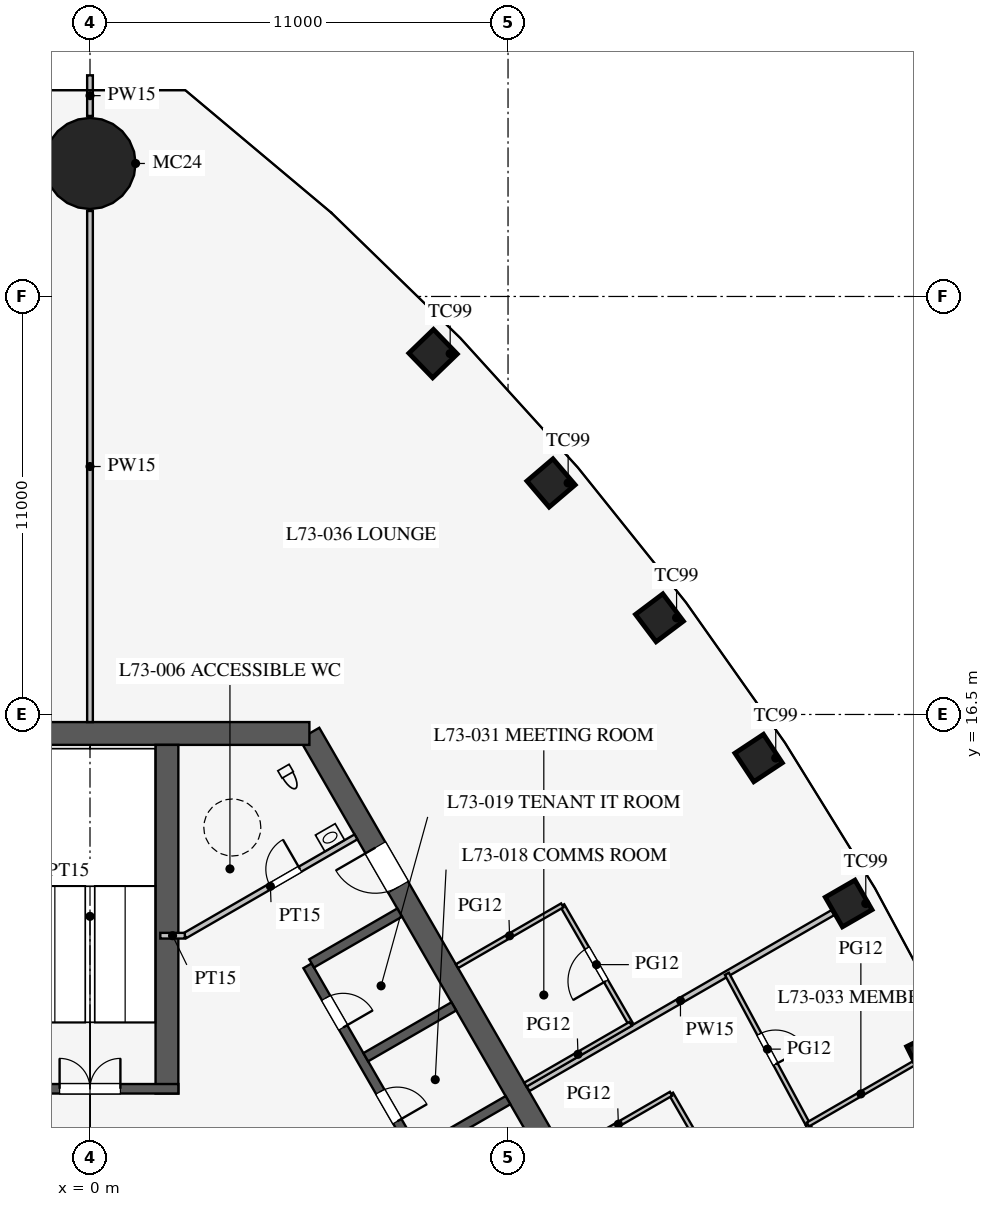
"""IFC4 building model, lengths in metres.
Left out: names, types, materials, properties, quantities, classifications, styles, units other than length and angle.
Written with IfcOpenShell. Run it as: python <this file> out.ifc"""

import sys

from ifc_helpers import new_model, si_unit, direction, frame, frame_2d, origin, origin_2d, place, context, subcontext, project, spatial, rectangle, circle, extrude, element, fill, save


model = new_model("IFC4")
c1 = context("Model", 3, precision=1e-05, world=origin(), true_north=direction((0.0, 1.0)))
c2 = subcontext(c1, "Body", "Model", "MODEL_VIEW")
j1 = project(units=[si_unit("LENGTHUNIT", "METRE"), si_unit("PLANEANGLEUNIT", "RADIAN")], contexts=[c1])
p1 = place(None, origin())
s1 = spatial("IfcSite", under=j1, at=p1, CompositionType="ELEMENT")
p2 = place(p1, origin())
s2 = spatial("IfcBuilding", under=s1, at=p2, CompositionType="ELEMENT")
p3 = place(p2, frame((0.0, 0.0, 318.3)))
s3 = spatial("IfcBuildingStorey", under=s2, at=p3, CompositionType="ELEMENT", Elevation=318.3)
for number, where, z_axis, x_axis in (
    (1, (22.094, 7.56, 0.0), (0.0, 0.0, 1.0), (-0.447, 0.895, 0.0)),
    (2, (19.963, 11.526, 0.0), (0.0, 0.0, 1.0), (-0.5, 0.866, 0.0)),
    (3, (17.594, 15.354, 0.0), (0.0, 0.0, 1.0), (-0.552, 0.834, 0.0)),
    (4, (14.985, 19.044, 0.0), (0.0, 0.0, 1.0), (-0.601, 0.799, 0.0)),
    (5, (12.132, 22.593, 0.0), (0.0, 0.0, 1.0), (-0.649, 0.761, 0.0)),
    (6, (9.027, 25.997, 0.0), (0.0, 0.0, 1.0), (-0.695, 0.719, 0.0)),
):
    element("IfcColumn", number, at=place(p3, frame(where, z_axis=z_axis, x_axis=x_axis)), inside=s3, PredefinedType="COLUMN", context=c2, shape_type="SweptSolid", body=[
        extrude(rectangle(XDim=0.9, YDim=0.9, at=origin_2d()), origin(), (0.0, 0.0, 1.0), 4.2),
    ])
p4 = place(p3, frame((0.0, 31.0, 0.0), z_axis=(0.0, 0.0, 1.0), x_axis=(1.0, 0.0, 0.0)))
e7 = element("IfcColumn", 7, at=p4, inside=s3, PredefinedType="COLUMN", context=c2, shape_type="SweptSolid", body=[
    extrude(circle(Radius=1.2, at=origin_2d()), origin(), (0.0, 0.0, 1.0), 4.2),
])
p5 = place(p3, frame((16.743, -3.0, 0.0), z_axis=(0.0, 0.0, 1.0), x_axis=(-0.500002442456, 0.866023993627, 0.0)))
e8 = element("IfcWall", 8, at=p5, inside=s3, PredefinedType="SHEAR", context=c2, shape_type="SweptSolid", body=[
    extrude(rectangle(XDim=21.939, YDim=0.6, at=frame_2d((10.97, 0.0))), origin(), (0.0, 0.0, 1.0), 4.2),
])
p6 = place(p5, frame((17.27, 0.0, 0.0)))
e9 = element("IfcOpeningElement", 9, at=p6, cuts=e8, PredefinedType="OPENING", context=c2, shape_type="SweptSolid", body=[
    extrude(rectangle(XDim=1.2, YDim=2.1, at=frame_2d((0.6, 1.05))), frame((0.0, 0.31, 0.0), z_axis=(0.0, -1.0, 0.0), x_axis=(1.0, 0.0, 0.0)), (0.0, 0.0, 1.0), 0.62),
])
p7 = place(p5, frame((3.47, 0.0, 0.0)))
e10 = element("IfcOpeningElement", 10, at=p7, cuts=e8, PredefinedType="OPENING", context=c2, shape_type="SweptSolid", body=[
    extrude(rectangle(XDim=1.2, YDim=2.1, at=frame_2d((0.6, 1.05))), frame((0.0, 0.31, 0.0), z_axis=(0.0, -1.0, 0.0), x_axis=(1.0, 0.0, 0.0)), (0.0, 0.0, 1.0), 0.62),
])
p8 = place(p3, frame((5.773, 16.0, 0.0), z_axis=(0.0, 0.0, 1.0), x_axis=(-1.0, 0.0, 0.0)))
e11 = element("IfcWall", 11, at=p8, inside=s3, PredefinedType="SHEAR", context=c2, shape_type="SweptSolid", body=[
    extrude(rectangle(XDim=11.547, YDim=0.6, at=frame_2d((5.773, 0.0))), origin(), (0.0, 0.0, 1.0), 4.2),
])
p9 = place(p3, frame((11.424, 0.014, 0.0), z_axis=(0.0, 0.0, 1.0), x_axis=(-0.500001763848, 0.866024385424, 0.0)))
e12 = element("IfcWall", 12, at=p9, inside=s3, PredefinedType="SHEAR", context=c2, shape_type="SweptSolid", body=[
    extrude(rectangle(XDim=11.4, YDim=0.25, at=frame_2d((5.7, 0.0))), origin(), (0.0, 0.0, 1.0), 4.2),
])
p10 = place(p9, frame((0.975, 0.0, 0.0)))
e13 = element("IfcOpeningElement", 13, at=p10, cuts=e12, PredefinedType="OPENING", context=c2, shape_type="SweptSolid", body=[
    extrude(rectangle(XDim=0.9, YDim=2.1, at=frame_2d((0.45, 1.05))), frame((0.0, 0.135, 0.0), z_axis=(0.0, -1.0, 0.0), x_axis=(1.0, 0.0, 0.0)), (0.0, 0.0, 1.0), 0.27),
])
p11 = place(p9, frame((3.825, 0.0, 0.0)))
e14 = element("IfcOpeningElement", 14, at=p11, cuts=e12, PredefinedType="OPENING", context=c2, shape_type="SweptSolid", body=[
    extrude(rectangle(XDim=0.9, YDim=2.1, at=frame_2d((0.45, 1.05))), frame((0.0, 0.135, 0.0), z_axis=(0.0, -1.0, 0.0), x_axis=(1.0, 0.0, 0.0)), (0.0, 0.0, 1.0), 0.27),
])
p12 = place(p9, frame((6.675, 0.0, 0.0)))
e15 = element("IfcOpeningElement", 15, at=p12, cuts=e12, PredefinedType="OPENING", context=c2, shape_type="SweptSolid", body=[
    extrude(rectangle(XDim=0.9, YDim=2.1, at=frame_2d((0.45, 1.05))), frame((0.0, 0.135, 0.0), z_axis=(0.0, -1.0, 0.0), x_axis=(1.0, 0.0, 0.0)), (0.0, 0.0, 1.0), 0.27),
])
p13 = place(p9, frame((9.525, 0.0, 0.0)))
e16 = element("IfcOpeningElement", 16, at=p13, cuts=e12, PredefinedType="OPENING", context=c2, shape_type="SweptSolid", body=[
    extrude(rectangle(XDim=0.9, YDim=2.1, at=frame_2d((0.45, 1.05))), frame((0.0, 0.135, 0.0), z_axis=(0.0, -1.0, 0.0), x_axis=(1.0, 0.0, 0.0)), (0.0, 0.0, 1.0), 0.27),
])
for number, where, z_axis, x_axis in (
    (17, (8.682, 5.012, 0.0), (0.0, 0.0, 1.0), (0.866, 0.5, 0.0)),
    (18, (7.257, 7.481, 0.0), (0.0, 0.0, 1.0), (0.866, 0.5, 0.0)),
    (19, (5.832, 9.949, 0.0), (0.0, 0.0, 1.0), (0.866, 0.5, 0.0)),
):
    element("IfcWall", number, at=place(p3, frame(where, z_axis=z_axis, x_axis=x_axis)), inside=s3, PredefinedType="SHEAR", context=c2, shape_type="SweptSolid", body=[
        extrude(rectangle(XDim=2.675, YDim=0.25, at=frame_2d((1.337, 0.0))), origin(), (0.0, 0.0, 1.0), 4.2),
    ])
p14 = place(p3, frame((2.025, 6.525, 0.0), z_axis=(0.0, 0.0, 1.0), x_axis=(0.0, 1.0, 0.0)))
e20 = element("IfcWall", 20, at=p14, inside=s3, PredefinedType="SHEAR", context=c2, shape_type="SweptSolid", body=[
    extrude(rectangle(XDim=9.175, YDim=0.6, at=frame_2d((4.587, 0.0))), origin(), (0.0, 0.0, 1.0), 4.2),
])
p15 = place(p3, frame((2.325, 6.65, 0.0), z_axis=(0.0, 0.0, 1.0), x_axis=(-1.0, 0.0, 0.0)))
e21 = element("IfcWall", 21, at=p15, inside=s3, PredefinedType="SHEAR", context=c2, shape_type="SweptSolid", body=[
    extrude(rectangle(XDim=4.65, YDim=0.25, at=frame_2d((2.325, 0.0))), origin(), (0.0, 0.0, 1.0), 4.2),
])
p16 = place(p15, frame((1.525, 0.0, 0.0)))
e22 = element("IfcOpeningElement", 22, at=p16, cuts=e21, PredefinedType="OPENING", context=c2, shape_type="SweptSolid", body=[
    extrude(rectangle(XDim=1.6, YDim=2.1, at=frame_2d((0.8, 1.05))), frame((0.0, 0.135, 0.0), z_axis=(0.0, -1.0, 0.0), x_axis=(1.0, 0.0, 0.0)), (0.0, 0.0, 1.0), 0.27),
])
p17 = place(p3, frame((2.495, 10.678, 0.0), z_axis=(0.0, 0.0, 1.0), x_axis=(0.866021400173, 0.500006934395, 0.0)))
e23 = element("IfcWall", 23, at=p17, inside=s3, PredefinedType="PARTITIONING", context=c2, shape_type="SweptSolid", body=[
    extrude(rectangle(XDim=5.2, YDim=0.15, at=frame_2d((2.6, 0.0))), origin(), (0.0, 0.0, 1.0), 4.0),
])
p18 = place(p17, frame((2.6, 0.0, 0.0)))
e24 = element("IfcOpeningElement", 24, at=p18, cuts=e23, PredefinedType="OPENING", context=c2, shape_type="SweptSolid", body=[
    extrude(rectangle(XDim=0.9, YDim=2.1, at=frame_2d((0.45, 1.05))), frame((0.0, 0.085, 0.0), z_axis=(0.0, -1.0, 0.0), x_axis=(1.0, 0.0, 0.0)), (0.0, 0.0, 1.0), 0.17),
])
p19 = place(p3, frame((2.495, 10.678, 0.0), z_axis=(0.0, 0.0, 1.0), x_axis=(-1.0, 0.0, 0.0)))
e25 = element("IfcWall", 25, at=p19, inside=s3, PredefinedType="PARTITIONING", context=c2, shape_type="SweptSolid", body=[
    extrude(rectangle(XDim=0.645, YDim=0.15, at=frame_2d((0.323, 0.0))), origin(), (0.0, 0.0, 1.0), 4.0),
])
p20 = place(p3, frame((0.0, 16.3, 0.0), z_axis=(0.0, 0.0, 1.0), x_axis=(0.0, 1.0, 0.0)))
e26 = element("IfcWall", 26, at=p20, inside=s3, PredefinedType="PARTITIONING", context=c2, shape_type="SweptSolid", body=[
    extrude(rectangle(XDim=13.45, YDim=0.15, at=frame_2d((6.725, 0.0))), origin(), (0.0, 0.0, 1.0), 2.0),
])
p21 = place(p3, frame((0.0, 32.25, 0.0), z_axis=(0.0, 0.0, 1.0), x_axis=(0.0, 1.0, 0.0)))
e27 = element("IfcWall", 27, at=p21, inside=s3, PredefinedType="PARTITIONING", context=c2, shape_type="SweptSolid", body=[
    extrude(rectangle(XDim=1.07, YDim=0.15, at=frame_2d((0.535, 0.0))), origin(), (0.0, 0.0, 1.0), 2.0),
])
p22 = place(p3, frame((11.527, 6.655, 0.0), z_axis=(0.0, 0.0, 1.0), x_axis=(0.866021846952, 0.500006160563, 0.0)))
e28 = element("IfcWall", 28, at=p22, inside=s3, PredefinedType="PARTITIONING", context=c2, shape_type="SweptSolid", body=[
    extrude(rectangle(XDim=9.262, YDim=0.15, at=frame_2d((4.631, 0.0))), origin(), (0.0, 0.0, 1.0), 3.3),
])
p23 = place(p3, frame((14.227, 8.358, 0.0), z_axis=(0.0, 0.0, 1.0), x_axis=(-0.499961193289, 0.866047807691, 0.0)))
e29 = element("IfcWall", 29, at=p23, inside=s3, PredefinedType="PARTITIONING", context=c2, shape_type="SweptSolid", body=[
    extrude(rectangle(XDim=3.6, YDim=0.12, at=frame_2d((1.8, 0.0))), origin(), (0.0, 0.0, 1.0), 2.9),
])
p24 = place(p23, frame((1.3, 0.0, 0.15)))
e30 = element("IfcOpeningElement", 30, at=p24, cuts=e29, PredefinedType="OPENING", context=c2, shape_type="SweptSolid", body=[
    extrude(rectangle(XDim=1.0, YDim=2.1, at=frame_2d((0.5, 1.05))), frame((0.0, 0.07, 0.0), z_axis=(0.0, -1.0, 0.0), x_axis=(1.0, 0.0, 0.0)), (0.0, 0.0, 1.0), 0.14),
])
p25 = place(p3, frame((17.089, 3.4, 0.0), z_axis=(0.0, 0.0, 1.0), x_axis=(-0.499982693035, 0.866035395735, 0.0)))
e31 = element("IfcWall", 31, at=p25, inside=s3, PredefinedType="PARTITIONING", context=c2, shape_type="SweptSolid", body=[
    extrude(rectangle(XDim=3.6, YDim=0.12, at=frame_2d((1.8, 0.0))), origin(), (0.0, 0.0, 1.0), 2.9),
])
p26 = place(p25, frame((1.3, 0.0, 0.15)))
e32 = element("IfcOpeningElement", 32, at=p26, cuts=e31, PredefinedType="OPENING", context=c2, shape_type="SweptSolid", body=[
    extrude(rectangle(XDim=1.0, YDim=2.1, at=frame_2d((0.5, 1.05))), frame((0.0, 0.07, 0.0), z_axis=(0.0, -1.0, 0.0), x_axis=(1.0, 0.0, 0.0)), (0.0, 0.0, 1.0), 0.14),
])
p27 = place(p3, frame((11.456, 6.758, 0.0), z_axis=(0.0, 0.0, 1.0), x_axis=(0.866042017984, 0.499971222258, 0.0)))
e33 = element("IfcWall", 33, at=p27, inside=s3, PredefinedType="PARTITIONING", context=c2, shape_type="SweptSolid", body=[
    extrude(rectangle(XDim=3.2, YDim=0.12, at=frame_2d((1.6, 0.0))), origin(), (0.0, 0.0, 1.0), 2.9),
])
p28 = place(p3, frame((9.656, 9.876, 0.0), z_axis=(0.0, 0.0, 1.0), x_axis=(0.866061088033, 0.499938187974, 0.0)))
e34 = element("IfcWall", 34, at=p28, inside=s3, PredefinedType="PARTITIONING", context=c2, shape_type="SweptSolid", body=[
    extrude(rectangle(XDim=3.2, YDim=0.12, at=frame_2d((1.6, 0.0))), origin(), (0.0, 0.0, 1.0), 2.9),
])
p29 = place(p3, frame((12.518, 4.918, 0.0), z_axis=(0.0, 0.0, 1.0), x_axis=(0.866008981251, 0.500028443584, 0.0)))
e35 = element("IfcWall", 35, at=p29, inside=s3, PredefinedType="PARTITIONING", context=c2, shape_type="SweptSolid", body=[
    extrude(rectangle(XDim=3.2, YDim=0.12, at=frame_2d((1.6, 0.0))), origin(), (0.0, 0.0, 1.0), 2.9),
])
p30 = place(p3, frame((18.891, 5.71, 0.0), z_axis=(0.0, 0.0, 1.0), x_axis=(-0.473524102582, 0.880780860529, 0.0)))
e36 = element("IfcWall", 36, at=p30, inside=s3, PredefinedType="PARTITIONING", context=c2, shape_type="SweptSolid", body=[
    extrude(rectangle(XDim=4.502, YDim=0.12, at=frame_2d((2.251, 0.0))), origin(), (0.0, 0.0, 1.0), 2.9),
])
p31 = place(p30, frame((1.8, 0.0, 0.15)))
e37 = element("IfcOpeningElement", 37, at=p31, cuts=e36, PredefinedType="OPENING", context=c2, shape_type="SweptSolid", body=[
    extrude(rectangle(XDim=0.9, YDim=2.1, at=frame_2d((0.45, 1.05))), frame((0.0, 0.07, 0.0), z_axis=(0.0, -1.0, 0.0), x_axis=(1.0, 0.0, 0.0)), (0.0, 0.0, 1.0), 0.14),
])
p32 = place(p3, frame((20.786, 1.608, 0.0), z_axis=(0.0, 0.0, 1.0), x_axis=(-0.419335693458, 0.907831248742, 0.0)))
e38 = element("IfcWall", 38, at=p32, inside=s3, PredefinedType="PARTITIONING", context=c2, shape_type="SweptSolid", body=[
    extrude(rectangle(XDim=4.519, YDim=0.12, at=frame_2d((2.259, 0.0))), origin(), (0.0, 0.0, 1.0), 2.9),
])
p33 = place(p32, frame((1.8, 0.0, 0.15)))
e39 = element("IfcOpeningElement", 39, at=p33, cuts=e38, PredefinedType="OPENING", context=c2, shape_type="SweptSolid", body=[
    extrude(rectangle(XDim=0.9, YDim=2.1, at=frame_2d((0.45, 1.05))), frame((0.0, 0.07, 0.0), z_axis=(0.0, -1.0, 0.0), x_axis=(1.0, 0.0, 0.0)), (0.0, 0.0, 1.0), 0.14),
])
p34 = place(p3, frame((18.891, 5.71, 0.0), z_axis=(0.0, 0.0, 1.0), x_axis=(0.866021328928, 0.500007057792, 0.0)))
e40 = element("IfcWall", 40, at=p34, inside=s3, PredefinedType="PARTITIONING", context=c2, shape_type="SweptSolid", body=[
    extrude(rectangle(XDim=3.218, YDim=0.12, at=frame_2d((1.609, 0.0))), origin(), (0.0, 0.0, 1.0), 2.9),
])
p35 = place(p18, origin())
e41 = element("IfcDoor", 41, at=p35, inside=s3, OperationType="SINGLE_SWING_RIGHT", PredefinedType="DOOR", context=c2, shape_type="SweptSolid", body=[
    extrude(rectangle(XDim=0.9, YDim=2.1, at=frame_2d((0.45, 1.05))), frame((0.0, 0.025, 0.0), z_axis=(0.0, -1.0, 0.0), x_axis=(1.0, 0.0, 0.0)), (0.0, 0.0, 1.0), 0.05),
])
fill(e24, e41)
p36 = place(p16, frame((1.6, 0.0, 0.0), z_axis=(0.0, 0.0, 1.0), x_axis=(-1.0, 0.0, 0.0)))
e42 = element("IfcDoor", 42, at=p36, inside=s3, OperationType="DOUBLE_DOOR_SINGLE_SWING", PredefinedType="DOOR", context=c2, shape_type="SweptSolid", body=[
    extrude(rectangle(XDim=1.6, YDim=2.1, at=frame_2d((0.8, 1.05))), frame((0.0, 0.025, 0.0), z_axis=(0.0, -1.0, 0.0), x_axis=(1.0, 0.0, 0.0)), (0.0, 0.0, 1.0), 0.05),
])
fill(e22, e42)
p37 = place(p6, origin())
e43 = element("IfcDoor", 43, at=p37, inside=s3, OperationType="SINGLE_SWING_RIGHT", PredefinedType="DOOR", context=c2, shape_type="SweptSolid", body=[
    extrude(rectangle(XDim=1.2, YDim=2.1, at=frame_2d((0.6, 1.05))), frame((0.0, 0.025, 0.0), z_axis=(0.0, -1.0, 0.0), x_axis=(1.0, 0.0, 0.0)), (0.0, 0.0, 1.0), 0.05),
])
fill(e9, e43)
p38 = place(p12, frame((0.9, 0.0, 0.0), z_axis=(0.0, 0.0, 1.0), x_axis=(-1.0, 0.0, 0.0)))
e44 = element("IfcDoor", 44, at=p38, inside=s3, OperationType="SINGLE_SWING_RIGHT", PredefinedType="DOOR", context=c2, shape_type="SweptSolid", body=[
    extrude(rectangle(XDim=0.9, YDim=2.1, at=frame_2d((0.45, 1.05))), frame((0.0, 0.025, 0.0), z_axis=(0.0, -1.0, 0.0), x_axis=(1.0, 0.0, 0.0)), (0.0, 0.0, 1.0), 0.05),
])
fill(e15, e44)
p39 = place(p13, frame((0.9, 0.0, 0.0), z_axis=(0.0, 0.0, 1.0), x_axis=(-1.0, 0.0, 0.0)))
e45 = element("IfcDoor", 45, at=p39, inside=s3, OperationType="SINGLE_SWING_RIGHT", PredefinedType="DOOR", context=c2, shape_type="SweptSolid", body=[
    extrude(rectangle(XDim=0.9, YDim=2.1, at=frame_2d((0.45, 1.05))), frame((0.0, 0.025, 0.0), z_axis=(0.0, -1.0, 0.0), x_axis=(1.0, 0.0, 0.0)), (0.0, 0.0, 1.0), 0.05),
])
fill(e16, e45)
p40 = place(p24, origin())
e46 = element("IfcDoor", 46, at=p40, inside=s3, OperationType="SINGLE_SWING_LEFT", PredefinedType="DOOR", context=c2, shape_type="SweptSolid", body=[
    extrude(rectangle(XDim=1.0, YDim=2.1, at=frame_2d((0.5, 1.05))), frame((0.0, 0.025, 0.0), z_axis=(0.0, -1.0, 0.0), x_axis=(1.0, 0.0, 0.0)), (0.0, 0.0, 1.0), 0.05),
])
fill(e30, e46)
p41 = place(p31, frame((0.9, 0.0, 0.0), z_axis=(0.0, 0.0, 1.0), x_axis=(-1.0, 0.0, 0.0)))
e47 = element("IfcDoor", 47, at=p41, inside=s3, OperationType="SINGLE_SWING_RIGHT", PredefinedType="DOOR", context=c2, shape_type="SweptSolid", body=[
    extrude(rectangle(XDim=0.9, YDim=2.1, at=frame_2d((0.45, 1.05))), frame((0.0, 0.025, 0.0), z_axis=(0.0, -1.0, 0.0), x_axis=(1.0, 0.0, 0.0)), (0.0, 0.0, 1.0), 0.05),
])
fill(e37, e47)
save(model, sys.argv[1])
